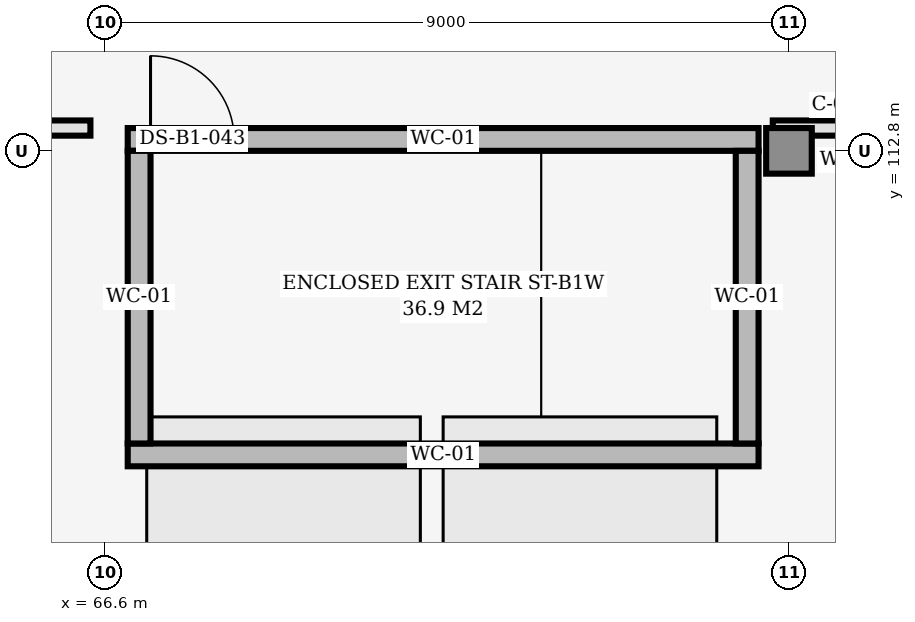
"""IFC4 building model, lengths in metres.
Left out: names, types, materials, properties, quantities, classifications, styles, units other than length and angle.
Written with IfcOpenShell. Run it as: python <this file> out.ifc"""

import sys

from ifc_helpers import new_model, si_unit, direction, frame, frame_2d, origin, origin_2d, place, context, subcontext, project, spatial, rectangle, extrude, element, fill, save


model = new_model("IFC4")
c1 = context("Model", 3, precision=1e-05, world=origin(), true_north=direction((0.0, 1.0)))
c2 = subcontext(c1, "Body", "Model", "MODEL_VIEW")
j1 = project(units=[si_unit("LENGTHUNIT", "METRE"), si_unit("PLANEANGLEUNIT", "RADIAN")], contexts=[c1])
p1 = place(None, origin())
s1 = spatial("IfcSite", under=j1, at=p1, CompositionType="ELEMENT")
p2 = place(p1, origin())
s2 = spatial("IfcBuilding", under=s1, at=p2, CompositionType="ELEMENT")
p3 = place(p2, frame((0.0, 0.0, -4.5)))
s3 = spatial("IfcBuildingStorey", under=s2, at=p3, CompositionType="ELEMENT", Elevation=-4.5)
p4 = place(p3, frame((75.6, 112.8, 0.0), z_axis=(0.0, 0.0, 1.0), x_axis=(1.0, 0.0, 0.0)))
e1 = element("IfcColumn", 1, at=p4, inside=s3, PredefinedType="COLUMN", context=c2, shape_type="SweptSolid", body=[
    extrude(rectangle(XDim=0.6, YDim=0.6, at=origin_2d()), origin(), (0.0, 0.0, 1.0), 4.5),
])
p5 = place(p3, frame((66.9, 108.8, 0.0), z_axis=(0.0, 0.0, 1.0), x_axis=(1.0, 0.0, 0.0)))
e2 = element("IfcWall", 2, at=p5, inside=s3, PredefinedType="SHEAR", context=c2, shape_type="SweptSolid", body=[
    extrude(rectangle(XDim=8.3, YDim=0.3, at=frame_2d((4.15, 0.0))), origin(), (0.0, 0.0, 1.0), 4.15),
])
p6 = place(p3, frame((66.9, 112.95, 0.0), z_axis=(0.0, 0.0, 1.0), x_axis=(1.0, 0.0, 0.0)))
e3 = element("IfcWall", 3, at=p6, inside=s3, PredefinedType="SHEAR", context=c2, shape_type="SweptSolid", body=[
    extrude(rectangle(XDim=8.3, YDim=0.3, at=frame_2d((4.15, 0.0))), origin(), (0.0, 0.0, 1.0), 4.15),
])
p7 = place(p6, frame((0.3, 0.0, 0.0)))
e4 = element("IfcOpeningElement", 4, at=p7, cuts=e3, PredefinedType="OPENING", context=c2, shape_type="SweptSolid", body=[
    extrude(rectangle(XDim=1.1, YDim=2.15, at=frame_2d((0.55, 1.075))), frame((0.0, 0.16, 0.0), z_axis=(0.0, -1.0, 0.0), x_axis=(1.0, 0.0, 0.0)), (0.0, 0.0, 1.0), 0.32),
])
for number, where, z_axis, x_axis in (
    (5, (67.05, 108.95, 0.0), (0.0, 0.0, 1.0), (0.0, 1.0, 0.0)),
    (6, (75.05, 108.95, 0.0), (0.0, 0.0, 1.0), (0.0, 1.0, 0.0)),
):
    element("IfcWall", number, at=place(p3, frame(where, z_axis=z_axis, x_axis=x_axis)), inside=s3, PredefinedType="SHEAR", context=c2, shape_type="SweptSolid", body=[
        extrude(rectangle(XDim=3.85, YDim=0.3, at=frame_2d((1.925, 0.0))), origin(), (0.0, 0.0, 1.0), 4.15),
    ])
p8 = place(p3, frame((75.387, 113.1, 0.0), z_axis=(0.0, 0.0, 1.0), x_axis=(1.0, 0.0, 0.0)))
e7 = element("IfcWall", 7, at=p8, inside=s3, PredefinedType="PARTITIONING", context=c2, shape_type="SweptSolid", body=[
    extrude(rectangle(XDim=2.067, YDim=0.2, at=frame_2d((1.034, 0.0))), origin(), (0.0, 0.0, 1.0), 3.485),
])
p9 = place(p3, frame((57.82, 113.1, 0.0), z_axis=(0.0, 0.0, 1.0), x_axis=(1.0, 0.0, 0.0)))
e8 = element("IfcWall", 8, at=p9, inside=s3, PredefinedType="PARTITIONING", context=c2, shape_type="SweptSolid", body=[
    extrude(rectangle(XDim=8.589, YDim=0.2, at=frame_2d((4.294, 0.0))), origin(), (0.0, 0.0, 1.0), 3.235),
])
p10 = place(p7, origin())
e9 = element("IfcDoor", 9, at=p10, inside=s3, OperationType="SINGLE_SWING_LEFT", PredefinedType="DOOR", context=c2, shape_type="SweptSolid", body=[
    extrude(rectangle(XDim=1.1, YDim=2.15, at=frame_2d((0.55, 1.075))), frame((0.0, 0.025, 0.0), z_axis=(0.0, -1.0, 0.0), x_axis=(1.0, 0.0, 0.0)), (0.0, 0.0, 1.0), 0.05),
])
fill(e4, e9)
save(model, sys.argv[1])
